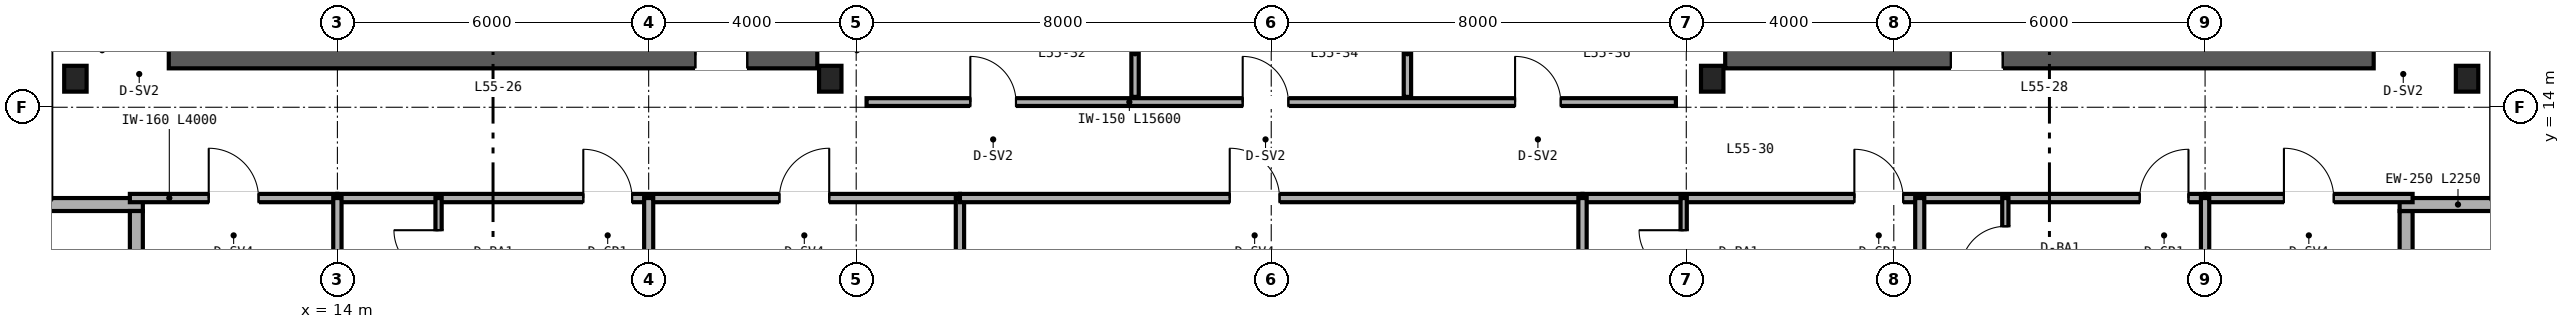
"""IFC4 building model, lengths in metres.
Left out: names, types, materials, properties, quantities, classifications, styles, units other than length and angle.
Written with IfcOpenShell. Run it as: python <this file> out.ifc"""

import sys

from ifc_helpers import new_model, si_unit, direction, frame, frame_2d, origin, origin_2d, place, context, subcontext, project, spatial, rectangle, i_section, extrude, source, transform, mapped, element, fill, save


model = new_model("IFC4")
c1 = context("Model", 3, precision=1e-05, world=origin(), true_north=direction((0.0, 1.0)))
c2 = subcontext(c1, "Body", "Model", "MODEL_VIEW")
j1 = project(units=[si_unit("LENGTHUNIT", "METRE"), si_unit("PLANEANGLEUNIT", "RADIAN")], contexts=[c1])
p1 = place(None, origin())
s1 = spatial("IfcSite", under=j1, at=p1, CompositionType="ELEMENT")
p2 = place(p1, origin())
s2 = spatial("IfcBuilding", under=s1, at=p2, CompositionType="ELEMENT")
p3 = place(p2, frame((0.0, 0.0, 217.2)))
s3 = spatial("IfcBuildingStorey", under=s2, at=p3, CompositionType="ELEMENT", Elevation=217.2)
p4 = place(p3, frame((10.75, 15.0, 0.0), z_axis=(0.0, 0.0, 1.0), x_axis=(1.0, 0.0, 0.0)))
e1 = element("IfcWall", 1, at=p4, inside=s3, PredefinedType="SHEAR", context=c2, shape_type="SweptSolid", body=[
    extrude(rectangle(XDim=12.5, YDim=0.5, at=frame_2d((6.25, 0.0))), origin(), (0.0, 0.0, 1.0), 3.28),
])
p5 = place(p4, frame((10.15, 0.0, 0.0)))
e2 = element("IfcOpeningElement", 2, at=p5, cuts=e1, PredefinedType="OPENING", context=c2, shape_type="SweptSolid", body=[
    extrude(rectangle(XDim=1.0, YDim=2.15, at=frame_2d((0.5, 1.075))), frame((0.0, 0.26, 0.0), z_axis=(0.0, -1.0, 0.0), x_axis=(1.0, 0.0, 0.0)), (0.0, 0.0, 1.0), 0.52),
])
p6 = place(p3, frame((40.75, 15.0, 0.0), z_axis=(0.0, 0.0, 1.0), x_axis=(1.0, 0.0, 0.0)))
e3 = element("IfcWall", 3, at=p6, inside=s3, PredefinedType="SHEAR", context=c2, shape_type="SweptSolid", body=[
    extrude(rectangle(XDim=12.5, YDim=0.5, at=frame_2d((6.25, 0.0))), origin(), (0.0, 0.0, 1.0), 3.28),
])
p7 = place(p6, frame((4.35, 0.0, 0.0)))
e4 = element("IfcOpeningElement", 4, at=p7, cuts=e3, PredefinedType="OPENING", context=c2, shape_type="SweptSolid", body=[
    extrude(rectangle(XDim=1.0, YDim=2.15, at=frame_2d((0.5, 1.075))), frame((0.0, 0.26, 0.0), z_axis=(0.0, -1.0, 0.0), x_axis=(1.0, 0.0, 0.0)), (0.0, 0.0, 1.0), 0.52),
])
m1 = source(origin(), c2, "Body", "SweptSolid", [
    extrude(i_section(OverallWidth=0.432, OverallDepth=0.498, WebThickness=0.056, FlangeThickness=0.089, FilletRadius=0.025, at=origin_2d()), origin(), (0.0, 0.0, 1.0), 3.28),
])
for number, where, z_axis, x_axis in (
    (5, (8.95, 14.55, 0.0), (0.0, 0.0, 1.0), (1.0, 0.0, 0.0)),
    (6, (23.5, 14.55, 0.0), (0.0, 0.0, 1.0), (1.0, 0.0, 0.0)),
    (7, (40.5, 14.55, 0.0), (0.0, 0.0, 1.0), (1.0, 0.0, 0.0)),
    (8, (55.05, 14.55, 0.0), (0.0, 0.0, 1.0), (1.0, 0.0, 0.0)),
):
    element("IfcColumn", number, at=place(p3, frame(where, z_axis=z_axis, x_axis=x_axis)), inside=s3, PredefinedType="COLUMN", context=c2, shape_type="MappedRepresentation", body=[
        mapped(m1, transform((0.0, 0.0, 0.0), scale=1.0)),
    ])
p8 = place(p3, frame((53.875, 10.0, 0.0), z_axis=(0.0, 0.0, 1.0), x_axis=(0.0, 1.0, 0.0)))
e9 = element("IfcWall", 9, at=p8, inside=s3, PredefinedType="SOLIDWALL", context=c2, shape_type="SweptSolid", body=[
    extrude(rectangle(XDim=2.0, YDim=0.25, at=frame_2d((1.0, 0.0))), origin(), (0.0, 0.0, 1.0), 3.28),
])
for number, where, z_axis, x_axis in (
    (10, (53.75, 12.125, 0.0), (0.0, 0.0, 1.0), (1.0, 0.0, 0.0)),
    (11, (8.0, 12.125, 0.0), (0.0, 0.0, 1.0), (1.0, 0.0, 0.0)),
):
    element("IfcWall", number, at=place(p3, frame(where, z_axis=z_axis, x_axis=x_axis)), inside=s3, PredefinedType="SOLIDWALL", context=c2, shape_type="SweptSolid", body=[
        extrude(rectangle(XDim=2.25, YDim=0.25, at=frame_2d((1.125, 0.0))), origin(), (0.0, 0.0, 1.0), 3.28),
    ])
p9 = place(p3, frame((10.125, 12.0, 0.0), z_axis=(0.0, 0.0, 1.0), x_axis=(0.0, -1.0, 0.0)))
e12 = element("IfcWall", 12, at=p9, inside=s3, PredefinedType="SOLIDWALL", context=c2, shape_type="SweptSolid", body=[
    extrude(rectangle(XDim=2.0, YDim=0.25, at=frame_2d((1.0, 0.0))), origin(), (0.0, 0.0, 1.0), 3.28),
])
p10 = place(p3, frame((24.2, 14.1, 0.0), z_axis=(0.0, 0.0, 1.0), x_axis=(1.0, 0.0, 0.0)))
e13 = element("IfcWall", 13, at=p10, inside=s3, PredefinedType="PARTITIONING", context=c2, shape_type="SweptSolid", body=[
    extrude(rectangle(XDim=15.6, YDim=0.15, at=frame_2d((7.8, 0.0))), origin(), (0.0, 0.0, 1.0), 3.28),
])
p11 = place(p10, frame((2.0, 0.0, 0.0)))
e14 = element("IfcOpeningElement", 14, at=p11, cuts=e13, PredefinedType="OPENING", context=c2, shape_type="SweptSolid", body=[
    extrude(rectangle(XDim=0.88, YDim=2.15, at=frame_2d((0.44, 1.075))), frame((0.0, 0.085, 0.0), z_axis=(0.0, -1.0, 0.0), x_axis=(1.0, 0.0, 0.0)), (0.0, 0.0, 1.0), 0.17),
])
p12 = place(p10, frame((7.25, 0.0, 0.0)))
e15 = element("IfcOpeningElement", 15, at=p12, cuts=e13, PredefinedType="OPENING", context=c2, shape_type="SweptSolid", body=[
    extrude(rectangle(XDim=0.88, YDim=2.15, at=frame_2d((0.44, 1.075))), frame((0.0, 0.085, 0.0), z_axis=(0.0, -1.0, 0.0), x_axis=(1.0, 0.0, 0.0)), (0.0, 0.0, 1.0), 0.17),
])
p13 = place(p10, frame((12.5, 0.0, 0.0)))
e16 = element("IfcOpeningElement", 16, at=p13, cuts=e13, PredefinedType="OPENING", context=c2, shape_type="SweptSolid", body=[
    extrude(rectangle(XDim=0.88, YDim=2.15, at=frame_2d((0.44, 1.075))), frame((0.0, 0.085, 0.0), z_axis=(0.0, -1.0, 0.0), x_axis=(1.0, 0.0, 0.0)), (0.0, 0.0, 1.0), 0.17),
])
for number, where, z_axis, x_axis in (
    (17, (29.375, 14.2, 0.0), (0.0, 0.0, 1.0), (0.0, 1.0, 0.0)),
    (18, (34.625, 14.2, 0.0), (0.0, 0.0, 1.0), (0.0, 1.0, 0.0)),
):
    element("IfcWall", number, at=place(p3, frame(where, z_axis=z_axis, x_axis=x_axis)), inside=s3, PredefinedType="PARTITIONING", context=c2, shape_type="SweptSolid", body=[
        extrude(rectangle(XDim=1.68, YDim=0.142, at=frame_2d((0.84, 0.0))), origin(), (0.0, 0.0, 1.0), 3.28),
    ])
p14 = place(p3, frame((10.0, 12.25, 0.0), z_axis=(0.0, 0.0, 1.0), x_axis=(1.0, 0.0, 0.0)))
e19 = element("IfcWall", 19, at=p14, inside=s3, PredefinedType="PARTITIONING", context=c2, shape_type="SweptSolid", body=[
    extrude(rectangle(XDim=4.0, YDim=0.16, at=frame_2d((2.0, 0.0))), origin(), (0.0, 0.0, 1.0), 3.28),
])
p15 = place(p14, frame((1.52, 0.0, 0.0)))
e20 = element("IfcOpeningElement", 20, at=p15, cuts=e19, PredefinedType="OPENING", context=c2, shape_type="SweptSolid", body=[
    extrude(rectangle(XDim=0.96, YDim=2.15, at=frame_2d((0.48, 1.075))), frame((0.0, 0.09, 0.0), z_axis=(0.0, -1.0, 0.0), x_axis=(1.0, 0.0, 0.0)), (0.0, 0.0, 1.0), 0.18),
])
p16 = place(p3, frame((50.0, 12.25, 0.0), z_axis=(0.0, 0.0, 1.0), x_axis=(1.0, 0.0, 0.0)))
e21 = element("IfcWall", 21, at=p16, inside=s3, PredefinedType="PARTITIONING", context=c2, shape_type="SweptSolid", body=[
    extrude(rectangle(XDim=4.0, YDim=0.16, at=frame_2d((2.0, 0.0))), origin(), (0.0, 0.0, 1.0), 3.28),
])
p17 = place(p16, frame((1.52, 0.0, 0.0)))
e22 = element("IfcOpeningElement", 22, at=p17, cuts=e21, PredefinedType="OPENING", context=c2, shape_type="SweptSolid", body=[
    extrude(rectangle(XDim=0.96, YDim=2.15, at=frame_2d((0.48, 1.075))), frame((0.0, 0.09, 0.0), z_axis=(0.0, -1.0, 0.0), x_axis=(1.0, 0.0, 0.0)), (0.0, 0.0, 1.0), 0.18),
])
p18 = place(p3, frame((14.0, 12.25, 0.0), z_axis=(0.0, 0.0, 1.0), x_axis=(1.0, 0.0, 0.0)))
e23 = element("IfcWall", 23, at=p18, inside=s3, PredefinedType="PARTITIONING", context=c2, shape_type="SweptSolid", body=[
    extrude(rectangle(XDim=12.0, YDim=0.16, at=frame_2d((6.0, 0.0))), origin(), (0.0, 0.0, 1.0), 2.823),
])
p19 = place(p18, frame((4.74, 0.0, 0.0)))
e24 = element("IfcOpeningElement", 24, at=p19, cuts=e23, PredefinedType="OPENING", context=c2, shape_type="SweptSolid", body=[
    extrude(rectangle(XDim=0.94, YDim=2.15, at=frame_2d((0.47, 1.075))), frame((0.0, 0.09, 0.0), z_axis=(0.0, -1.0, 0.0), x_axis=(1.0, 0.0, 0.0)), (0.0, 0.0, 1.0), 0.18),
])
p20 = place(p18, frame((8.52, 0.0, 0.0)))
e25 = element("IfcOpeningElement", 25, at=p20, cuts=e23, PredefinedType="OPENING", context=c2, shape_type="SweptSolid", body=[
    extrude(rectangle(XDim=0.96, YDim=2.15, at=frame_2d((0.48, 1.075))), frame((0.0, 0.09, 0.0), z_axis=(0.0, -1.0, 0.0), x_axis=(1.0, 0.0, 0.0)), (0.0, 0.0, 1.0), 0.18),
])
p21 = place(p3, frame((14.0, 6.36, 0.0), z_axis=(0.0, 0.0, 1.0), x_axis=(0.0, 1.0, 0.0)))
e26 = element("IfcWall", 26, at=p21, inside=s3, PredefinedType="PARTITIONING", context=c2, shape_type="SweptSolid", body=[
    extrude(rectangle(XDim=5.89, YDim=0.16, at=frame_2d((2.945, 0.0))), origin(), (0.0, 0.0, 1.0), 2.587),
])
p22 = place(p3, frame((26.0, 6.36, 0.0), z_axis=(0.0, 0.0, 1.0), x_axis=(0.0, 1.0, 0.0)))
e27 = element("IfcWall", 27, at=p22, inside=s3, PredefinedType="PARTITIONING", context=c2, shape_type="SweptSolid", body=[
    extrude(rectangle(XDim=5.89, YDim=0.16, at=frame_2d((2.945, 0.0))), origin(), (0.0, 0.0, 1.0), 2.36),
])
p23 = place(p3, frame((20.0, 6.36, 0.0), z_axis=(0.0, 0.0, 1.0), x_axis=(0.0, 1.0, 0.0)))
e28 = element("IfcWall", 28, at=p23, inside=s3, PredefinedType="PARTITIONING", context=c2, shape_type="SweptSolid", body=[
    extrude(rectangle(XDim=5.89, YDim=0.175, at=frame_2d((2.945, 0.0))), origin(), (0.0, 0.0, 1.0), 2.587),
])
p24 = place(p3, frame((15.95, 10.15, 0.0), z_axis=(0.0, 0.0, 1.0), x_axis=(0.0, 1.0, 0.0)))
e29 = element("IfcWall", 29, at=p24, inside=s3, PredefinedType="PARTITIONING", context=c2, shape_type="SweptSolid", body=[
    extrude(rectangle(XDim=2.1, YDim=0.12, at=frame_2d((1.05, 0.0))), origin(), (0.0, 0.0, 1.0), 3.28),
])
p25 = place(p24, frame((0.62, 0.0, 0.0)))
e30 = element("IfcOpeningElement", 30, at=p25, cuts=e29, PredefinedType="OPENING", context=c2, shape_type="SweptSolid", body=[
    extrude(rectangle(XDim=0.86, YDim=2.1, at=frame_2d((0.43, 1.05))), frame((0.0, 0.07, 0.0), z_axis=(0.0, -1.0, 0.0), x_axis=(1.0, 0.0, 0.0)), (0.0, 0.0, 1.0), 0.14),
])
p26 = place(p3, frame((26.0, 12.25, 0.0), z_axis=(0.0, 0.0, 1.0), x_axis=(1.0, 0.0, 0.0)))
e31 = element("IfcWall", 31, at=p26, inside=s3, PredefinedType="PARTITIONING", context=c2, shape_type="SweptSolid", body=[
    extrude(rectangle(XDim=12.0, YDim=0.16, at=frame_2d((6.0, 0.0))), origin(), (0.0, 0.0, 1.0), 3.28),
])
p27 = place(p26, frame((5.2, 0.0, 0.0)))
e32 = element("IfcOpeningElement", 32, at=p27, cuts=e31, PredefinedType="OPENING", context=c2, shape_type="SweptSolid", body=[
    extrude(rectangle(XDim=0.96, YDim=2.15, at=frame_2d((0.48, 1.075))), frame((0.0, 0.09, 0.0), z_axis=(0.0, -1.0, 0.0), x_axis=(1.0, 0.0, 0.0)), (0.0, 0.0, 1.0), 0.18),
])
p28 = place(p3, frame((38.0, 12.25, 0.0), z_axis=(0.0, 0.0, 1.0), x_axis=(1.0, 0.0, 0.0)))
e33 = element("IfcWall", 33, at=p28, inside=s3, PredefinedType="PARTITIONING", context=c2, shape_type="SweptSolid", body=[
    extrude(rectangle(XDim=12.0, YDim=0.16, at=frame_2d((6.0, 0.0))), origin(), (0.0, 0.0, 1.0), 2.823),
])
p29 = place(p28, frame((5.24, 0.0, 0.0)))
e34 = element("IfcOpeningElement", 34, at=p29, cuts=e33, PredefinedType="OPENING", context=c2, shape_type="SweptSolid", body=[
    extrude(rectangle(XDim=0.94, YDim=2.15, at=frame_2d((0.47, 1.075))), frame((0.0, 0.09, 0.0), z_axis=(0.0, -1.0, 0.0), x_axis=(1.0, 0.0, 0.0)), (0.0, 0.0, 1.0), 0.18),
])
p30 = place(p28, frame((10.74, 0.0, 0.0)))
e35 = element("IfcOpeningElement", 35, at=p30, cuts=e33, PredefinedType="OPENING", context=c2, shape_type="SweptSolid", body=[
    extrude(rectangle(XDim=0.94, YDim=2.15, at=frame_2d((0.47, 1.075))), frame((0.0, 0.09, 0.0), z_axis=(0.0, -1.0, 0.0), x_axis=(1.0, 0.0, 0.0)), (0.0, 0.0, 1.0), 0.18),
])
p31 = place(p3, frame((38.0, 6.36, 0.0), z_axis=(0.0, 0.0, 1.0), x_axis=(0.0, 1.0, 0.0)))
e36 = element("IfcWall", 36, at=p31, inside=s3, PredefinedType="PARTITIONING", context=c2, shape_type="SweptSolid", body=[
    extrude(rectangle(XDim=5.89, YDim=0.16, at=frame_2d((2.945, 0.0))), origin(), (0.0, 0.0, 1.0), 2.36),
])
p32 = place(p3, frame((50.0, 6.36, 0.0), z_axis=(0.0, 0.0, 1.0), x_axis=(0.0, 1.0, 0.0)))
e37 = element("IfcWall", 37, at=p32, inside=s3, PredefinedType="PARTITIONING", context=c2, shape_type="SweptSolid", body=[
    extrude(rectangle(XDim=5.89, YDim=0.16, at=frame_2d((2.945, 0.0))), origin(), (0.0, 0.0, 1.0), 2.587),
])
p33 = place(p3, frame((44.5, 6.36, 0.0), z_axis=(0.0, 0.0, 1.0), x_axis=(0.0, 1.0, 0.0)))
e38 = element("IfcWall", 38, at=p33, inside=s3, PredefinedType="PARTITIONING", context=c2, shape_type="SweptSolid", body=[
    extrude(rectangle(XDim=5.89, YDim=0.175, at=frame_2d((2.945, 0.0))), origin(), (0.0, 0.0, 1.0), 2.587),
])
p34 = place(p3, frame((39.95, 10.15, 0.0), z_axis=(0.0, 0.0, 1.0), x_axis=(0.0, 1.0, 0.0)))
e39 = element("IfcWall", 39, at=p34, inside=s3, PredefinedType="PARTITIONING", context=c2, shape_type="SweptSolid", body=[
    extrude(rectangle(XDim=2.1, YDim=0.12, at=frame_2d((1.05, 0.0))), origin(), (0.0, 0.0, 1.0), 3.28),
])
p35 = place(p34, frame((0.62, 0.0, 0.0)))
e40 = element("IfcOpeningElement", 40, at=p35, cuts=e39, PredefinedType="OPENING", context=c2, shape_type="SweptSolid", body=[
    extrude(rectangle(XDim=0.86, YDim=2.1, at=frame_2d((0.43, 1.05))), frame((0.0, 0.07, 0.0), z_axis=(0.0, -1.0, 0.0), x_axis=(1.0, 0.0, 0.0)), (0.0, 0.0, 1.0), 0.14),
])
p36 = place(p3, frame((46.15, 10.3, 0.0), z_axis=(0.0, 0.0, 1.0), x_axis=(0.0, 1.0, 0.0)))
e41 = element("IfcWall", 41, at=p36, inside=s3, PredefinedType="PARTITIONING", context=c2, shape_type="SweptSolid", body=[
    extrude(rectangle(XDim=1.95, YDim=0.12, at=frame_2d((0.975, 0.0))), origin(), (0.0, 0.0, 1.0), 3.28),
])
p37 = place(p36, frame((0.545, 0.0, 0.0)))
e42 = element("IfcOpeningElement", 42, at=p37, cuts=e41, PredefinedType="OPENING", context=c2, shape_type="SweptSolid", body=[
    extrude(rectangle(XDim=0.86, YDim=2.1, at=frame_2d((0.43, 1.05))), frame((0.0, 0.07, 0.0), z_axis=(0.0, -1.0, 0.0), x_axis=(1.0, 0.0, 0.0)), (0.0, 0.0, 1.0), 0.14),
])
m2 = source(origin(), c2, "Body", "SweptSolid", [
    extrude(rectangle(XDim=1.0, YDim=2.15, at=frame_2d((0.5, 1.075))), frame((0.0, 0.025, 0.0), z_axis=(0.0, -1.0, 0.0), x_axis=(1.0, 0.0, 0.0)), (0.0, 0.0, 1.0), 0.05),
])
p38 = place(p5, origin())
e43 = element("IfcDoor", 43, at=p38, inside=s3, OperationType="SINGLE_SWING_LEFT", PredefinedType="DOOR", context=c2, shape_type="MappedRepresentation", body=[
    mapped(m2, transform((0.0, 0.0, 0.0), scale=1.0)),
])
fill(e2, e43)
p39 = place(p7, origin())
e44 = element("IfcDoor", 44, at=p39, inside=s3, OperationType="SINGLE_SWING_RIGHT", PredefinedType="DOOR", context=c2, shape_type="MappedRepresentation", body=[
    mapped(m2, transform((0.0, 0.0, 0.0), scale=1.0)),
])
fill(e4, e44)
m3 = source(origin(), c2, "Body", "SweptSolid", [
    extrude(rectangle(XDim=0.88, YDim=2.15, at=frame_2d((0.44, 1.075))), frame((0.0, 0.025, 0.0), z_axis=(0.0, -1.0, 0.0), x_axis=(1.0, 0.0, 0.0)), (0.0, 0.0, 1.0), 0.05),
])
p40 = place(p11, origin())
e45 = element("IfcDoor", 45, at=p40, inside=s3, OperationType="SINGLE_SWING_LEFT", PredefinedType="DOOR", context=c2, shape_type="MappedRepresentation", body=[
    mapped(m3, transform((0.0, 0.0, 0.0), scale=1.0)),
])
fill(e14, e45)
p41 = place(p12, origin())
e46 = element("IfcDoor", 46, at=p41, inside=s3, OperationType="SINGLE_SWING_LEFT", PredefinedType="DOOR", context=c2, shape_type="MappedRepresentation", body=[
    mapped(m3, transform((0.0, 0.0, 0.0), scale=1.0)),
])
fill(e15, e46)
p42 = place(p13, origin())
e47 = element("IfcDoor", 47, at=p42, inside=s3, OperationType="SINGLE_SWING_LEFT", PredefinedType="DOOR", context=c2, shape_type="MappedRepresentation", body=[
    mapped(m3, transform((0.0, 0.0, 0.0), scale=1.0)),
])
fill(e16, e47)
m4 = source(origin(), c2, "Body", "SweptSolid", [
    extrude(rectangle(XDim=0.96, YDim=2.15, at=frame_2d((0.48, 1.075))), frame((0.0, 0.025, 0.0), z_axis=(0.0, -1.0, 0.0), x_axis=(1.0, 0.0, 0.0)), (0.0, 0.0, 1.0), 0.05),
])
p43 = place(p15, origin())
e48 = element("IfcDoor", 48, at=p43, inside=s3, OperationType="SINGLE_SWING_LEFT", PredefinedType="DOOR", context=c2, shape_type="MappedRepresentation", body=[
    mapped(m4, transform((0.0, 0.0, 0.0), scale=1.0)),
])
fill(e20, e48)
p44 = place(p17, origin())
e49 = element("IfcDoor", 49, at=p44, inside=s3, OperationType="SINGLE_SWING_LEFT", PredefinedType="DOOR", context=c2, shape_type="MappedRepresentation", body=[
    mapped(m4, transform((0.0, 0.0, 0.0), scale=1.0)),
])
fill(e22, e49)
m5 = source(origin(), c2, "Body", "SweptSolid", [
    extrude(rectangle(XDim=0.86, YDim=2.1, at=frame_2d((0.43, 1.05))), frame((0.0, 0.025, 0.0), z_axis=(0.0, -1.0, 0.0), x_axis=(1.0, 0.0, 0.0)), (0.0, 0.0, 1.0), 0.05),
])
p45 = place(p25, origin())
e50 = element("IfcDoor", 50, at=p45, inside=s3, OperationType="SINGLE_SWING_RIGHT", PredefinedType="DOOR", context=c2, shape_type="MappedRepresentation", body=[
    mapped(m5, transform((0.0, 0.0, 0.0), scale=1.0)),
])
fill(e30, e50)
m6 = source(origin(), c2, "Body", "SweptSolid", [
    extrude(rectangle(XDim=0.94, YDim=2.15, at=frame_2d((0.47, 1.075))), frame((0.0, 0.025, 0.0), z_axis=(0.0, -1.0, 0.0), x_axis=(1.0, 0.0, 0.0)), (0.0, 0.0, 1.0), 0.05),
])
p46 = place(p19, origin())
e51 = element("IfcDoor", 51, at=p46, inside=s3, OperationType="SINGLE_SWING_LEFT", PredefinedType="DOOR", context=c2, shape_type="MappedRepresentation", body=[
    mapped(m6, transform((0.0, 0.0, 0.0), scale=1.0)),
])
fill(e24, e51)
p47 = place(p20, origin())
e52 = element("IfcDoor", 52, at=p47, inside=s3, OperationType="SINGLE_SWING_RIGHT", PredefinedType="DOOR", context=c2, shape_type="MappedRepresentation", body=[
    mapped(m4, transform((0.0, 0.0, 0.0), scale=1.0)),
])
fill(e25, e52)
p48 = place(p27, origin())
e53 = element("IfcDoor", 53, at=p48, inside=s3, OperationType="SINGLE_SWING_LEFT", PredefinedType="DOOR", context=c2, shape_type="MappedRepresentation", body=[
    mapped(m4, transform((0.0, 0.0, 0.0), scale=1.0)),
])
fill(e32, e53)
p49 = place(p35, origin())
e54 = element("IfcDoor", 54, at=p49, inside=s3, OperationType="SINGLE_SWING_RIGHT", PredefinedType="DOOR", context=c2, shape_type="MappedRepresentation", body=[
    mapped(m5, transform((0.0, 0.0, 0.0), scale=1.0)),
])
fill(e40, e54)
p50 = place(p37, origin())
e55 = element("IfcDoor", 55, at=p50, inside=s3, OperationType="SINGLE_SWING_LEFT", PredefinedType="DOOR", context=c2, shape_type="MappedRepresentation", body=[
    mapped(m5, transform((0.0, 0.0, 0.0), scale=1.0)),
])
fill(e42, e55)
p51 = place(p29, origin())
e56 = element("IfcDoor", 56, at=p51, inside=s3, OperationType="SINGLE_SWING_LEFT", PredefinedType="DOOR", context=c2, shape_type="MappedRepresentation", body=[
    mapped(m6, transform((0.0, 0.0, 0.0), scale=1.0)),
])
fill(e34, e56)
p52 = place(p30, origin())
e57 = element("IfcDoor", 57, at=p52, inside=s3, OperationType="SINGLE_SWING_RIGHT", PredefinedType="DOOR", context=c2, shape_type="MappedRepresentation", body=[
    mapped(m6, transform((0.0, 0.0, 0.0), scale=1.0)),
])
fill(e35, e57)
save(model, sys.argv[1])
